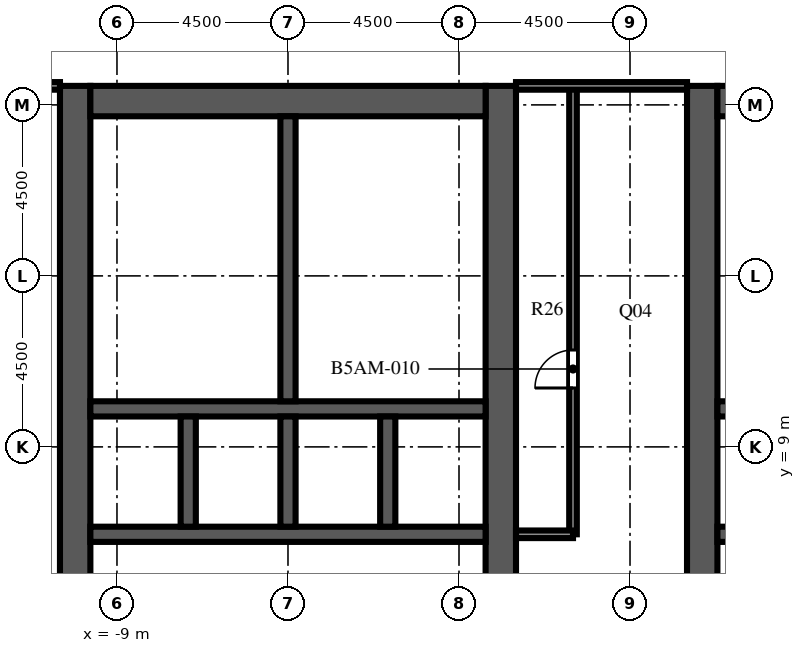
"""IFC4 building model, lengths in metres.
Left out: names, types, materials, properties, quantities, classifications, styles, units other than length and angle.
Written with IfcOpenShell. Run it as: python <this file> out.ifc"""

import sys

from ifc_helpers import new_model, si_unit, direction, frame, frame_2d, origin, place, context, subcontext, project, spatial, rectangle, extrude, element, fill, save


model = new_model("IFC4")
c1 = context("Model", 3, precision=1e-05, world=origin(), true_north=direction((0.0, 1.0)))
c2 = subcontext(c1, "Body", "Model", "MODEL_VIEW")
j1 = project(units=[si_unit("LENGTHUNIT", "METRE"), si_unit("PLANEANGLEUNIT", "RADIAN")], contexts=[c1])
p1 = place(None, origin())
s1 = spatial("IfcSite", under=j1, at=p1, CompositionType="ELEMENT")
p2 = place(p1, origin())
s2 = spatial("IfcBuilding", under=s1, at=p2, CompositionType="ELEMENT")
p3 = place(p2, frame((0.0, 0.0, 185.5)))
s3 = spatial("IfcBuildingStorey", under=s2, at=p3, CompositionType="ELEMENT", Elevation=185.5)
p4 = place(p3, frame((-10.1, -9.0, 0.0), z_axis=(0.0, 0.0, 1.0), x_axis=(0.0, 1.0, 0.0)))
e1 = element("IfcWall", 1, at=p4, inside=s3, PredefinedType="SHEAR", context=c2, shape_type="SweptSolid", body=[
    extrude(rectangle(XDim=27.5, YDim=0.8, at=frame_2d((13.75, 0.0))), origin(), (0.0, 0.0, 1.0), 6.0),
])
p5 = place(p4, frame((12.55, 0.0, 0.0)))
e2 = element("IfcOpeningElement", 2, at=p5, cuts=e1, PredefinedType="OPENING", context=c2, shape_type="SweptSolid", body=[
    extrude(rectangle(XDim=2.4, YDim=2.4, at=frame_2d((1.2, 1.2))), frame((0.0, 0.41, 0.0), z_axis=(0.0, -1.0, 0.0), x_axis=(1.0, 0.0, 0.0)), (0.0, 0.0, 1.0), 0.82),
])
p6 = place(p4, frame((6.825, 0.0, 0.0)))
e3 = element("IfcOpeningElement", 3, at=p6, cuts=e1, PredefinedType="OPENING", context=c2, shape_type="SweptSolid", body=[
    extrude(rectangle(XDim=1.2, YDim=2.1, at=frame_2d((0.6, 1.05))), frame((0.0, 0.41, 0.0), z_axis=(0.0, -1.0, 0.0), x_axis=(1.0, 0.0, 0.0)), (0.0, 0.0, 1.0), 0.82),
])
p7 = place(p4, frame((19.475, 0.0, 0.0)))
e4 = element("IfcOpeningElement", 4, at=p7, cuts=e1, PredefinedType="OPENING", context=c2, shape_type="SweptSolid", body=[
    extrude(rectangle(XDim=1.2, YDim=2.1, at=frame_2d((0.6, 1.05))), frame((0.0, 0.41, 0.0), z_axis=(0.0, -1.0, 0.0), x_axis=(1.0, 0.0, 0.0)), (0.0, 0.0, 1.0), 0.82),
])
p8 = place(p3, frame((1.1, -9.0, 0.0), z_axis=(0.0, 0.0, 1.0), x_axis=(0.0, 1.0, 0.0)))
e5 = element("IfcWall", 5, at=p8, inside=s3, PredefinedType="SHEAR", context=c2, shape_type="SweptSolid", body=[
    extrude(rectangle(XDim=27.5, YDim=0.8, at=frame_2d((13.75, 0.0))), origin(), (0.0, 0.0, 1.0), 6.0),
])
p9 = place(p8, frame((12.55, 0.0, 0.0)))
e6 = element("IfcOpeningElement", 6, at=p9, cuts=e5, PredefinedType="OPENING", context=c2, shape_type="SweptSolid", body=[
    extrude(rectangle(XDim=2.4, YDim=2.4, at=frame_2d((1.2, 1.2))), frame((0.0, 0.41, 0.0), z_axis=(0.0, -1.0, 0.0), x_axis=(1.0, 0.0, 0.0)), (0.0, 0.0, 1.0), 0.82),
])
p10 = place(p8, frame((3.85, 0.0, 0.0)))
e7 = element("IfcOpeningElement", 7, at=p10, cuts=e5, PredefinedType="OPENING", context=c2, shape_type="SweptSolid", body=[
    extrude(rectangle(XDim=0.95, YDim=2.1, at=frame_2d((0.475, 1.05))), frame((0.0, 0.41, 0.0), z_axis=(0.0, -1.0, 0.0), x_axis=(1.0, 0.0, 0.0)), (0.0, 0.0, 1.0), 0.82),
])
p11 = place(p8, frame((23.475, 0.0, 0.0)))
e8 = element("IfcOpeningElement", 8, at=p11, cuts=e5, PredefinedType="OPENING", context=c2, shape_type="SweptSolid", body=[
    extrude(rectangle(XDim=1.2, YDim=2.1, at=frame_2d((0.6, 1.05))), frame((0.0, 0.41, 0.0), z_axis=(0.0, -1.0, 0.0), x_axis=(1.0, 0.0, 0.0)), (0.0, 0.0, 1.0), 0.82),
])
p12 = place(p3, frame((-9.7, 18.1, 0.0), z_axis=(0.0, 0.0, 1.0), x_axis=(1.0, 0.0, 0.0)))
e9 = element("IfcWall", 9, at=p12, inside=s3, PredefinedType="SHEAR", context=c2, shape_type="SweptSolid", body=[
    extrude(rectangle(XDim=10.4, YDim=0.8, at=frame_2d((5.2, 0.0))), origin(), (0.0, 0.0, 1.0), 6.0),
])
p13 = place(p3, frame((-9.7, 6.7, 0.0), z_axis=(0.0, 0.0, 1.0), x_axis=(1.0, 0.0, 0.0)))
e10 = element("IfcWall", 10, at=p13, inside=s3, PredefinedType="SHEAR", context=c2, shape_type="SweptSolid", body=[
    extrude(rectangle(XDim=10.4, YDim=0.4, at=frame_2d((5.2, 0.0))), origin(), (0.0, 0.0, 1.0), 6.0),
])
p14 = place(p13, frame((3.337, 0.0, 0.0)))
e11 = element("IfcOpeningElement", 11, at=p14, cuts=e10, PredefinedType="OPENING", context=c2, shape_type="SweptSolid", body=[
    extrude(rectangle(XDim=1.1, YDim=2.1, at=frame_2d((0.55, 1.05))), frame((0.0, 0.21, 0.0), z_axis=(0.0, -1.0, 0.0), x_axis=(1.0, 0.0, 0.0)), (0.0, 0.0, 1.0), 0.42),
])
p15 = place(p13, frame((5.962, 0.0, 0.0)))
e12 = element("IfcOpeningElement", 12, at=p15, cuts=e10, PredefinedType="OPENING", context=c2, shape_type="SweptSolid", body=[
    extrude(rectangle(XDim=1.1, YDim=2.1, at=frame_2d((0.55, 1.05))), frame((0.0, 0.21, 0.0), z_axis=(0.0, -1.0, 0.0), x_axis=(1.0, 0.0, 0.0)), (0.0, 0.0, 1.0), 0.42),
])
p16 = place(p13, frame((8.663, 0.0, 0.0)))
e13 = element("IfcOpeningElement", 13, at=p16, cuts=e10, PredefinedType="OPENING", context=c2, shape_type="SweptSolid", body=[
    extrude(rectangle(XDim=1.1, YDim=2.1, at=frame_2d((0.55, 1.05))), frame((0.0, 0.21, 0.0), z_axis=(0.0, -1.0, 0.0), x_axis=(1.0, 0.0, 0.0)), (0.0, 0.0, 1.0), 0.42),
])
p17 = place(p13, frame((0.688, 0.0, 0.0)))
e14 = element("IfcOpeningElement", 14, at=p17, cuts=e10, PredefinedType="OPENING", context=c2, shape_type="SweptSolid", body=[
    extrude(rectangle(XDim=1.0, YDim=2.1, at=frame_2d((0.5, 1.05))), frame((0.0, 0.21, 0.0), z_axis=(0.0, -1.0, 0.0), x_axis=(1.0, 0.0, 0.0)), (0.0, 0.0, 1.0), 0.42),
])
p18 = place(p3, frame((-9.7, 10.0, 0.0), z_axis=(0.0, 0.0, 1.0), x_axis=(1.0, 0.0, 0.0)))
e15 = element("IfcWall", 15, at=p18, inside=s3, PredefinedType="SHEAR", context=c2, shape_type="SweptSolid", body=[
    extrude(rectangle(XDim=10.4, YDim=0.4, at=frame_2d((5.2, 0.0))), origin(), (0.0, 0.0, 1.0), 6.0),
])
for number, where, z_axis, x_axis in (
    (16, (-7.125, 6.9, 0.0), (0.0, 0.0, 1.0), (0.0, 1.0, 0.0)),
    (17, (-4.5, 6.9, 0.0), (0.0, 0.0, 1.0), (0.0, 1.0, 0.0)),
    (18, (-1.875, 6.9, 0.0), (0.0, 0.0, 1.0), (0.0, 1.0, 0.0)),
):
    element("IfcWall", number, at=place(p3, frame(where, z_axis=z_axis, x_axis=x_axis)), inside=s3, PredefinedType="SHEAR", context=c2, shape_type="SweptSolid", body=[
        extrude(rectangle(XDim=2.9, YDim=0.4, at=frame_2d((1.45, 0.0))), origin(), (0.0, 0.0, 1.0), 6.0),
    ])
p19 = place(p3, frame((-4.5, 10.2, 0.0), z_axis=(0.0, 0.0, 1.0), x_axis=(0.0, 1.0, 0.0)))
e19 = element("IfcWall", 19, at=p19, inside=s3, PredefinedType="SHEAR", context=c2, shape_type="SweptSolid", body=[
    extrude(rectangle(XDim=7.5, YDim=0.4, at=frame_2d((3.75, 0.0))), origin(), (0.0, 0.0, 1.0), 6.0),
])
p20 = place(p3, frame((6.4, -9.0, 0.0), z_axis=(0.0, 0.0, 1.0), x_axis=(0.0, 1.0, 0.0)))
e20 = element("IfcWall", 20, at=p20, inside=s3, PredefinedType="SHEAR", context=c2, shape_type="SweptSolid", body=[
    extrude(rectangle(XDim=27.5, YDim=0.8, at=frame_2d((13.75, 0.0))), origin(), (0.0, 0.0, 1.0), 6.0),
])
p21 = place(p20, frame((12.55, 0.0, 0.0)))
e21 = element("IfcOpeningElement", 21, at=p21, cuts=e20, PredefinedType="OPENING", context=c2, shape_type="SweptSolid", body=[
    extrude(rectangle(XDim=2.4, YDim=2.4, at=frame_2d((1.2, 1.2))), frame((0.0, 0.41, 0.0), z_axis=(0.0, -1.0, 0.0), x_axis=(1.0, 0.0, 0.0)), (0.0, 0.0, 1.0), 0.82),
])
p22 = place(p20, frame((3.85, 0.0, 0.0)))
e22 = element("IfcOpeningElement", 22, at=p22, cuts=e20, PredefinedType="OPENING", context=c2, shape_type="SweptSolid", body=[
    extrude(rectangle(XDim=0.95, YDim=2.1, at=frame_2d((0.475, 1.05))), frame((0.0, 0.41, 0.0), z_axis=(0.0, -1.0, 0.0), x_axis=(1.0, 0.0, 0.0)), (0.0, 0.0, 1.0), 0.82),
])
p23 = place(p20, frame((23.475, 0.0, 0.0)))
e23 = element("IfcOpeningElement", 23, at=p23, cuts=e20, PredefinedType="OPENING", context=c2, shape_type="SweptSolid", body=[
    extrude(rectangle(XDim=1.2, YDim=2.1, at=frame_2d((0.6, 1.05))), frame((0.0, 0.41, 0.0), z_axis=(0.0, -1.0, 0.0), x_axis=(1.0, 0.0, 0.0)), (0.0, 0.0, 1.0), 0.82),
])
p24 = place(p3, frame((6.8, 18.1, 0.0), z_axis=(0.0, 0.0, 1.0), x_axis=(1.0, 0.0, 0.0)))
e24 = element("IfcWall", 24, at=p24, inside=s3, PredefinedType="SHEAR", context=c2, shape_type="SweptSolid", body=[
    extrude(rectangle(XDim=10.4, YDim=0.8, at=frame_2d((5.2, 0.0))), origin(), (0.0, 0.0, 1.0), 6.0),
])
p25 = place(p3, frame((6.8, 6.7, 0.0), z_axis=(0.0, 0.0, 1.0), x_axis=(1.0, 0.0, 0.0)))
e25 = element("IfcWall", 25, at=p25, inside=s3, PredefinedType="SHEAR", context=c2, shape_type="SweptSolid", body=[
    extrude(rectangle(XDim=10.4, YDim=0.4, at=frame_2d((5.2, 0.0))), origin(), (0.0, 0.0, 1.0), 6.0),
])
p26 = place(p25, frame((3.337, 0.0, 0.0)))
e26 = element("IfcOpeningElement", 26, at=p26, cuts=e25, PredefinedType="OPENING", context=c2, shape_type="SweptSolid", body=[
    extrude(rectangle(XDim=1.1, YDim=2.1, at=frame_2d((0.55, 1.05))), frame((0.0, 0.21, 0.0), z_axis=(0.0, -1.0, 0.0), x_axis=(1.0, 0.0, 0.0)), (0.0, 0.0, 1.0), 0.42),
])
p27 = place(p25, frame((5.962, 0.0, 0.0)))
e27 = element("IfcOpeningElement", 27, at=p27, cuts=e25, PredefinedType="OPENING", context=c2, shape_type="SweptSolid", body=[
    extrude(rectangle(XDim=1.1, YDim=2.1, at=frame_2d((0.55, 1.05))), frame((0.0, 0.21, 0.0), z_axis=(0.0, -1.0, 0.0), x_axis=(1.0, 0.0, 0.0)), (0.0, 0.0, 1.0), 0.42),
])
p28 = place(p25, frame((8.663, 0.0, 0.0)))
e28 = element("IfcOpeningElement", 28, at=p28, cuts=e25, PredefinedType="OPENING", context=c2, shape_type="SweptSolid", body=[
    extrude(rectangle(XDim=1.1, YDim=2.1, at=frame_2d((0.55, 1.05))), frame((0.0, 0.21, 0.0), z_axis=(0.0, -1.0, 0.0), x_axis=(1.0, 0.0, 0.0)), (0.0, 0.0, 1.0), 0.42),
])
p29 = place(p25, frame((0.688, 0.0, 0.0)))
e29 = element("IfcOpeningElement", 29, at=p29, cuts=e25, PredefinedType="OPENING", context=c2, shape_type="SweptSolid", body=[
    extrude(rectangle(XDim=1.0, YDim=2.1, at=frame_2d((0.5, 1.05))), frame((0.0, 0.21, 0.0), z_axis=(0.0, -1.0, 0.0), x_axis=(1.0, 0.0, 0.0)), (0.0, 0.0, 1.0), 0.42),
])
p30 = place(p3, frame((6.8, 10.0, 0.0), z_axis=(0.0, 0.0, 1.0), x_axis=(1.0, 0.0, 0.0)))
e30 = element("IfcWall", 30, at=p30, inside=s3, PredefinedType="SHEAR", context=c2, shape_type="SweptSolid", body=[
    extrude(rectangle(XDim=10.4, YDim=0.4, at=frame_2d((5.2, 0.0))), origin(), (0.0, 0.0, 1.0), 6.0),
])
p31 = place(p3, frame((-0.6, 12.45, 0.0), z_axis=(0.0, 0.0, 1.0), x_axis=(1.0, 0.0, 0.0)))
e31 = element("IfcWall", 31, at=p31, inside=s3, PredefinedType="PARTITIONING", context=c2, shape_type="SweptSolid", body=[
    extrude(rectangle(XDim=1.3, YDim=0.1, at=frame_2d((0.65, 0.0))), origin(), (0.0, 0.0, 1.0), 5.55),
])
p32 = place(p31, frame((0.2, 0.0, 0.0)))
e32 = element("IfcOpeningElement", 32, at=p32, cuts=e31, PredefinedType="OPENING", context=c2, shape_type="SweptSolid", body=[
    extrude(rectangle(XDim=0.9, YDim=2.1, at=frame_2d((0.45, 1.05))), frame((0.0, 0.06, 0.0), z_axis=(0.0, -1.0, 0.0), x_axis=(1.0, 0.0, 0.0)), (0.0, 0.0, 1.0), 0.12),
])
p33 = place(p3, frame((-4.3, 12.45, 0.0), z_axis=(0.0, 0.0, 1.0), x_axis=(1.0, 0.0, 0.0)))
e33 = element("IfcWall", 33, at=p33, inside=s3, PredefinedType="PARTITIONING", context=c2, shape_type="SweptSolid", body=[
    extrude(rectangle(XDim=3.7, YDim=0.1, at=frame_2d((1.85, 0.0))), origin(), (0.0, 0.0, 1.0), 5.55),
])
p34 = place(p3, frame((-0.6, 12.45, 0.0), z_axis=(0.0, 0.0, 1.0), x_axis=(0.0, 1.0, 0.0)))
e34 = element("IfcWall", 34, at=p34, inside=s3, PredefinedType="PARTITIONING", context=c2, shape_type="SweptSolid", body=[
    extrude(rectangle(XDim=2.625, YDim=0.1, at=frame_2d((1.312, 0.0))), origin(), (0.0, 0.0, 1.0), 5.55),
])
p35 = place(p34, frame((0.812, 0.0, 0.0)))
e35 = element("IfcOpeningElement", 35, at=p35, cuts=e34, PredefinedType="OPENING", context=c2, shape_type="SweptSolid", body=[
    extrude(rectangle(XDim=1.0, YDim=2.1, at=frame_2d((0.5, 1.05))), frame((0.0, 0.06, 0.0), z_axis=(0.0, -1.0, 0.0), x_axis=(1.0, 0.0, 0.0)), (0.0, 0.0, 1.0), 0.12),
])
p36 = place(p3, frame((-0.6, 15.075, 0.0), z_axis=(0.0, 0.0, 1.0), x_axis=(0.0, 1.0, 0.0)))
e36 = element("IfcWall", 36, at=p36, inside=s3, PredefinedType="PARTITIONING", context=c2, shape_type="SweptSolid", body=[
    extrude(rectangle(XDim=2.625, YDim=0.1, at=frame_2d((1.312, 0.0))), origin(), (0.0, 0.0, 1.0), 5.55),
])
p37 = place(p36, frame((0.812, 0.0, 0.0)))
e37 = element("IfcOpeningElement", 37, at=p37, cuts=e36, PredefinedType="OPENING", context=c2, shape_type="SweptSolid", body=[
    extrude(rectangle(XDim=1.0, YDim=2.1, at=frame_2d((0.5, 1.05))), frame((0.0, 0.06, 0.0), z_axis=(0.0, -1.0, 0.0), x_axis=(1.0, 0.0, 0.0)), (0.0, 0.0, 1.0), 0.12),
])
p38 = place(p3, frame((-4.3, 15.075, 0.0), z_axis=(0.0, 0.0, 1.0), x_axis=(1.0, 0.0, 0.0)))
e38 = element("IfcWall", 38, at=p38, inside=s3, PredefinedType="PARTITIONING", context=c2, shape_type="SweptSolid", body=[
    extrude(rectangle(XDim=3.7, YDim=0.1, at=frame_2d((1.85, 0.0))), origin(), (0.0, 0.0, 1.0), 5.55),
])
p39 = place(p3, frame((6.8, 12.45, 0.0), z_axis=(0.0, 0.0, 1.0), x_axis=(1.0, 0.0, 0.0)))
e39 = element("IfcWall", 39, at=p39, inside=s3, PredefinedType="PARTITIONING", context=c2, shape_type="SweptSolid", body=[
    extrude(rectangle(XDim=1.3, YDim=0.1, at=frame_2d((0.65, 0.0))), origin(), (0.0, 0.0, 1.0), 5.55),
])
p40 = place(p39, frame((0.2, 0.0, 0.0)))
e40 = element("IfcOpeningElement", 40, at=p40, cuts=e39, PredefinedType="OPENING", context=c2, shape_type="SweptSolid", body=[
    extrude(rectangle(XDim=0.9, YDim=2.1, at=frame_2d((0.45, 1.05))), frame((0.0, 0.06, 0.0), z_axis=(0.0, -1.0, 0.0), x_axis=(1.0, 0.0, 0.0)), (0.0, 0.0, 1.0), 0.12),
])
p41 = place(p3, frame((3.0, 6.7, 0.0), z_axis=(0.0, 0.0, 1.0), x_axis=(0.0, 1.0, 0.0)))
e41 = element("IfcWall", 41, at=p41, inside=s3, PredefinedType="PARTITIONING", context=c2, shape_type="SweptSolid", body=[
    extrude(rectangle(XDim=11.8, YDim=0.2, at=frame_2d((5.9, 0.0))), origin(), (0.0, 0.0, 1.0), 5.55),
])
p42 = place(p41, frame((3.85, 0.0, 0.0)))
e42 = element("IfcOpeningElement", 42, at=p42, cuts=e41, PredefinedType="OPENING", context=c2, shape_type="SweptSolid", body=[
    extrude(rectangle(XDim=1.0, YDim=2.1, at=frame_2d((0.5, 1.05))), frame((0.0, 0.11, 0.0), z_axis=(0.0, -1.0, 0.0), x_axis=(1.0, 0.0, 0.0)), (0.0, 0.0, 1.0), 0.22),
])
p43 = place(p3, frame((1.5, 6.7, 0.0), z_axis=(0.0, 0.0, 1.0), x_axis=(1.0, 0.0, 0.0)))
e43 = element("IfcWall", 43, at=p43, inside=s3, PredefinedType="PARTITIONING", context=c2, shape_type="SweptSolid", body=[
    extrude(rectangle(XDim=1.5, YDim=0.2, at=frame_2d((0.75, 0.0))), origin(), (0.0, 0.0, 1.0), 5.55),
])
p44 = place(p3, frame((-13.5, 18.5, 0.0), z_axis=(0.0, 0.0, 1.0), x_axis=(1.0, 0.0, 0.0)))
e44 = element("IfcWall", 44, at=p44, inside=s3, PredefinedType="PARTITIONING", context=c2, shape_type="SweptSolid", body=[
    extrude(rectangle(XDim=3.0, YDim=0.2, at=frame_2d((1.5, 0.0))), origin(), (0.0, 0.0, 1.0), 5.55),
])
p45 = place(p44, frame((1.1, 0.0, 0.0)))
e45 = element("IfcOpeningElement", 45, at=p45, cuts=e44, PredefinedType="OPENING", context=c2, shape_type="SweptSolid", body=[
    extrude(rectangle(XDim=1.0, YDim=2.1, at=frame_2d((0.5, 1.05))), frame((0.0, 0.11, 0.0), z_axis=(0.0, -1.0, 0.0), x_axis=(1.0, 0.0, 0.0)), (0.0, 0.0, 1.0), 0.22),
])
p46 = place(p3, frame((1.5, 18.5, 0.0), z_axis=(0.0, 0.0, 1.0), x_axis=(1.0, 0.0, 0.0)))
e46 = element("IfcWall", 46, at=p46, inside=s3, PredefinedType="PARTITIONING", context=c2, shape_type="SweptSolid", body=[
    extrude(rectangle(XDim=4.5, YDim=0.2, at=frame_2d((2.25, 0.0))), origin(), (0.0, 0.0, 1.0), 5.55),
])
p47 = place(p14, origin())
e47 = element("IfcDoor", 47, at=p47, inside=s3, OperationType="DOUBLE_DOOR_SLIDING", PredefinedType="DOOR", context=c2, shape_type="SweptSolid", body=[
    extrude(rectangle(XDim=1.1, YDim=2.1, at=frame_2d((0.55, 1.05))), frame((0.0, 0.025, 0.0), z_axis=(0.0, -1.0, 0.0), x_axis=(1.0, 0.0, 0.0)), (0.0, 0.0, 1.0), 0.05),
])
fill(e11, e47)
p48 = place(p15, origin())
e48 = element("IfcDoor", 48, at=p48, inside=s3, OperationType="DOUBLE_DOOR_SLIDING", PredefinedType="DOOR", context=c2, shape_type="SweptSolid", body=[
    extrude(rectangle(XDim=1.1, YDim=2.1, at=frame_2d((0.55, 1.05))), frame((0.0, 0.025, 0.0), z_axis=(0.0, -1.0, 0.0), x_axis=(1.0, 0.0, 0.0)), (0.0, 0.0, 1.0), 0.05),
])
fill(e12, e48)
p49 = place(p16, origin())
e49 = element("IfcDoor", 49, at=p49, inside=s3, OperationType="DOUBLE_DOOR_SLIDING", PredefinedType="DOOR", context=c2, shape_type="SweptSolid", body=[
    extrude(rectangle(XDim=1.1, YDim=2.1, at=frame_2d((0.55, 1.05))), frame((0.0, 0.025, 0.0), z_axis=(0.0, -1.0, 0.0), x_axis=(1.0, 0.0, 0.0)), (0.0, 0.0, 1.0), 0.05),
])
fill(e13, e49)
p50 = place(p5, origin())
e50 = element("IfcDoor", 50, at=p50, inside=s3, OperationType="DOUBLE_DOOR_DOUBLE_SWING", PredefinedType="DOOR", context=c2, shape_type="SweptSolid", body=[
    extrude(rectangle(XDim=2.4, YDim=2.4, at=frame_2d((1.2, 1.2))), frame((0.0, 0.025, 0.0), z_axis=(0.0, -1.0, 0.0), x_axis=(1.0, 0.0, 0.0)), (0.0, 0.0, 1.0), 0.05),
])
fill(e2, e50)
p51 = place(p9, origin())
e51 = element("IfcDoor", 51, at=p51, inside=s3, OperationType="DOUBLE_DOOR_DOUBLE_SWING", PredefinedType="DOOR", context=c2, shape_type="SweptSolid", body=[
    extrude(rectangle(XDim=2.4, YDim=2.4, at=frame_2d((1.2, 1.2))), frame((0.0, 0.025, 0.0), z_axis=(0.0, -1.0, 0.0), x_axis=(1.0, 0.0, 0.0)), (0.0, 0.0, 1.0), 0.05),
])
fill(e6, e51)
p52 = place(p21, origin())
e52 = element("IfcDoor", 52, at=p52, inside=s3, OperationType="DOUBLE_DOOR_DOUBLE_SWING", PredefinedType="DOOR", context=c2, shape_type="SweptSolid", body=[
    extrude(rectangle(XDim=2.4, YDim=2.4, at=frame_2d((1.2, 1.2))), frame((0.0, 0.025, 0.0), z_axis=(0.0, -1.0, 0.0), x_axis=(1.0, 0.0, 0.0)), (0.0, 0.0, 1.0), 0.05),
])
fill(e21, e52)
p53 = place(p7, origin())
e53 = element("IfcDoor", 53, at=p53, inside=s3, OperationType="SINGLE_SWING_LEFT", PredefinedType="DOOR", context=c2, shape_type="SweptSolid", body=[
    extrude(rectangle(XDim=1.2, YDim=2.1, at=frame_2d((0.6, 1.05))), frame((0.0, 0.025, 0.0), z_axis=(0.0, -1.0, 0.0), x_axis=(1.0, 0.0, 0.0)), (0.0, 0.0, 1.0), 0.05),
])
fill(e4, e53)
p54 = place(p17, origin())
e54 = element("IfcDoor", 54, at=p54, inside=s3, OperationType="SINGLE_SWING_LEFT", PredefinedType="DOOR", context=c2, shape_type="SweptSolid", body=[
    extrude(rectangle(XDim=1.0, YDim=2.1, at=frame_2d((0.5, 1.05))), frame((0.0, 0.025, 0.0), z_axis=(0.0, -1.0, 0.0), x_axis=(1.0, 0.0, 0.0)), (0.0, 0.0, 1.0), 0.05),
])
fill(e14, e54)
p55 = place(p32, origin())
e55 = element("IfcDoor", 55, at=p55, inside=s3, OperationType="SINGLE_SWING_LEFT", PredefinedType="DOOR", context=c2, shape_type="SweptSolid", body=[
    extrude(rectangle(XDim=0.9, YDim=2.1, at=frame_2d((0.45, 1.05))), frame((0.0, 0.025, 0.0), z_axis=(0.0, -1.0, 0.0), x_axis=(1.0, 0.0, 0.0)), (0.0, 0.0, 1.0), 0.05),
])
fill(e32, e55)
p56 = place(p11, origin())
e56 = element("IfcDoor", 56, at=p56, inside=s3, OperationType="SINGLE_SWING_RIGHT", PredefinedType="DOOR", context=c2, shape_type="SweptSolid", body=[
    extrude(rectangle(XDim=1.2, YDim=2.1, at=frame_2d((0.6, 1.05))), frame((0.0, 0.375, 0.0), z_axis=(0.0, -1.0, 0.0), x_axis=(1.0, 0.0, 0.0)), (0.0, 0.0, 1.0), 0.05),
])
fill(e8, e56)
p57 = place(p35, origin())
e57 = element("IfcDoor", 57, at=p57, inside=s3, OperationType="SINGLE_SWING_LEFT", PredefinedType="DOOR", context=c2, shape_type="SweptSolid", body=[
    extrude(rectangle(XDim=1.0, YDim=2.1, at=frame_2d((0.5, 1.05))), frame((0.0, 0.025, 0.0), z_axis=(0.0, -1.0, 0.0), x_axis=(1.0, 0.0, 0.0)), (0.0, 0.0, 1.0), 0.05),
])
fill(e35, e57)
p58 = place(p37, origin())
e58 = element("IfcDoor", 58, at=p58, inside=s3, OperationType="SINGLE_SWING_RIGHT", PredefinedType="DOOR", context=c2, shape_type="SweptSolid", body=[
    extrude(rectangle(XDim=1.0, YDim=2.1, at=frame_2d((0.5, 1.05))), frame((0.0, 0.025, 0.0), z_axis=(0.0, -1.0, 0.0), x_axis=(1.0, 0.0, 0.0)), (0.0, 0.0, 1.0), 0.05),
])
fill(e37, e58)
p59 = place(p23, origin())
e59 = element("IfcDoor", 59, at=p59, inside=s3, OperationType="SINGLE_SWING_LEFT", PredefinedType="DOOR", context=c2, shape_type="SweptSolid", body=[
    extrude(rectangle(XDim=1.2, YDim=2.1, at=frame_2d((0.6, 1.05))), frame((0.0, -0.325, 0.0), z_axis=(0.0, -1.0, 0.0), x_axis=(1.0, 0.0, 0.0)), (0.0, 0.0, 1.0), 0.05),
])
fill(e23, e59)
p60 = place(p42, origin())
e60 = element("IfcDoor", 60, at=p60, inside=s3, OperationType="SINGLE_SWING_LEFT", PredefinedType="DOOR", context=c2, shape_type="SweptSolid", body=[
    extrude(rectangle(XDim=1.0, YDim=2.1, at=frame_2d((0.5, 1.05))), frame((0.0, 0.025, 0.0), z_axis=(0.0, -1.0, 0.0), x_axis=(1.0, 0.0, 0.0)), (0.0, 0.0, 1.0), 0.05),
])
fill(e42, e60)
save(model, sys.argv[1])
